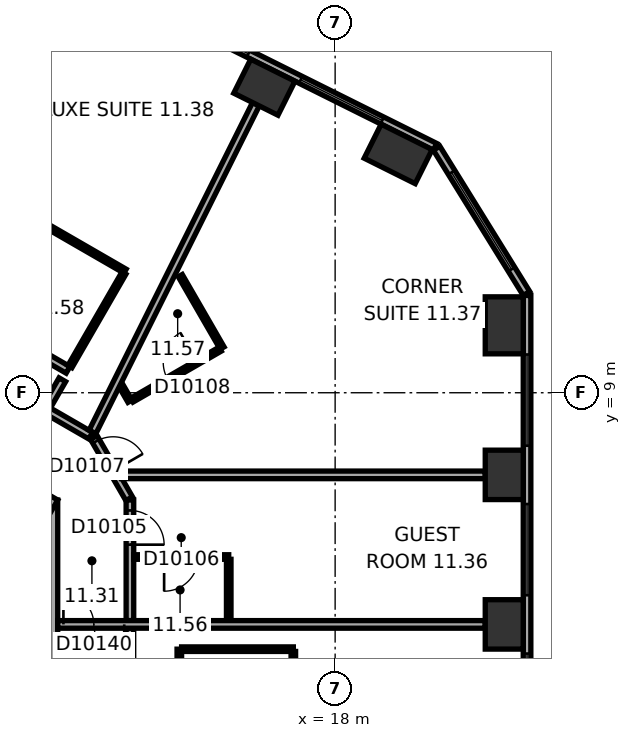
"""IFC4 building model, lengths in metres.
Left out: names, types, materials, properties, quantities, classifications, styles, units other than length and angle.
Written with IfcOpenShell. Run it as: python <this file> out.ifc"""

import sys

from ifc_helpers import new_model, si_unit, direction, frame, frame_2d, origin, origin_2d, place, context, subcontext, project, spatial, rectangle, extrude, element, fill, save


model = new_model("IFC4")
c1 = context("Model", 3, precision=1e-05, world=origin(), true_north=direction((0.0, 1.0)))
c2 = subcontext(c1, "Body", "Model", "MODEL_VIEW")
j1 = project(units=[si_unit("LENGTHUNIT", "METRE"), si_unit("PLANEANGLEUNIT", "RADIAN")], contexts=[c1])
p1 = place(None, origin())
s1 = spatial("IfcSite", under=j1, at=p1, CompositionType="ELEMENT")
p2 = place(p1, origin())
s2 = spatial("IfcBuilding", under=s1, at=p2, CompositionType="ELEMENT")
p3 = place(p2, frame((0.0, 0.0, 57.2)))
s3 = spatial("IfcBuildingStorey", under=s2, at=p3, CompositionType="ELEMENT", Elevation=57.2)
for number, where, z_axis, x_axis in (
    (1, (22.45, 2.905, 0.0), (0.0, 0.0, 1.0), (0.0, 1.0, 0.0)),
    (2, (22.45, 6.839, 0.0), (0.0, 0.0, 1.0), (0.0, 1.0, 0.0)),
):
    element("IfcColumn", number, at=place(p3, frame(where, z_axis=z_axis, x_axis=x_axis)), inside=s3, PredefinedType="COLUMN", context=c2, shape_type="SweptSolid", body=[
        extrude(rectangle(XDim=1.3, YDim=1.0, at=origin_2d()), origin(), (0.0, 0.0, 1.0), 3.3),
    ])
for number, where, z_axis, x_axis in (
    (3, (22.45, 10.774, 0.0), (0.0, 0.0, 1.0), (0.0, 1.0, 0.0)),
    (4, (19.659, 15.284, 0.0), (0.0, 0.0, 1.0), (-0.895, 0.446, 0.0)),
):
    element("IfcColumn", number, at=place(p3, frame(where, z_axis=z_axis, x_axis=x_axis)), inside=s3, PredefinedType="COLUMN", context=c2, shape_type="SweptSolid", body=[
        extrude(rectangle(XDim=1.5, YDim=1.0, at=origin_2d()), origin(), (0.0, 0.0, 1.0), 3.3),
    ])
p4 = place(p3, frame((16.138, 17.04, 0.0), z_axis=(0.0, 0.0, 1.0), x_axis=(-0.894934361602, 0.44619781311, 0.0)))
e5 = element("IfcColumn", 5, at=p4, inside=s3, PredefinedType="COLUMN", context=c2, shape_type="SweptSolid", body=[
    extrude(rectangle(XDim=1.3, YDim=1.0, at=origin_2d()), origin(), (0.0, 0.0, 1.0), 3.3),
])
p5 = place(p3, frame((10.1, -6.177, 0.0), z_axis=(0.0, 0.0, 1.0), x_axis=(0.0, 1.0, 0.0)))
e6 = element("IfcWall", 6, at=p5, inside=s3, PredefinedType="SHEAR", context=c2, shape_type="SweptSolid", body=[
    extrude(rectangle(XDim=12.355, YDim=1.2, at=frame_2d((6.177, 0.0))), origin(), (0.0, 0.0, 1.0), 3.3),
])
p6 = place(p5, frame((6.378, 0.0, 0.0)))
e7 = element("IfcOpeningElement", 7, at=p6, cuts=e6, PredefinedType="OPENING", context=c2, shape_type="SweptSolid", body=[
    extrude(rectangle(XDim=1.5, YDim=2.1, at=frame_2d((0.75, 1.05))), frame((0.0, 0.61, 0.0), z_axis=(0.0, -1.0, 0.0), x_axis=(1.0, 0.0, 0.0)), (0.0, 0.0, 1.0), 1.22),
])
p7 = place(p5, frame((1.828, 0.0, 0.0)))
e8 = element("IfcOpeningElement", 8, at=p7, cuts=e6, PredefinedType="OPENING", context=c2, shape_type="SweptSolid", body=[
    extrude(rectangle(XDim=1.1, YDim=2.1, at=frame_2d((0.55, 1.05))), frame((0.0, 0.61, 0.0), z_axis=(0.0, -1.0, 0.0), x_axis=(1.0, 0.0, 0.0)), (0.0, 0.0, 1.0), 1.22),
])
p8 = place(p5, frame((4.427, 0.0, 0.0)))
e9 = element("IfcOpeningElement", 9, at=p8, cuts=e6, PredefinedType="OPENING", context=c2, shape_type="SweptSolid", body=[
    extrude(rectangle(XDim=1.1, YDim=2.1, at=frame_2d((0.55, 1.05))), frame((0.0, 0.61, 0.0), z_axis=(0.0, -1.0, 0.0), x_axis=(1.0, 0.0, 0.0)), (0.0, 0.0, 1.0), 1.22),
])
p9 = place(p3, frame((10.4, 5.658, 0.0), z_axis=(0.0, 0.0, 1.0), x_axis=(-0.866021384402, 0.500006961711, 0.0)))
e10 = element("IfcWall", 10, at=p9, inside=s3, PredefinedType="SHEAR", context=c2, shape_type="SweptSolid", body=[
    extrude(rectangle(XDim=12.355, YDim=1.2, at=frame_2d((6.178, 0.0))), origin(), (0.0, 0.0, 1.0), 3.3),
])
p10 = place(p9, frame((2.728, 0.0, 0.0)))
e11 = element("IfcOpeningElement", 11, at=p10, cuts=e10, PredefinedType="OPENING", context=c2, shape_type="SweptSolid", body=[
    extrude(rectangle(XDim=1.1, YDim=2.1, at=frame_2d((0.55, 1.05))), frame((0.0, 0.61, 0.0), z_axis=(0.0, -1.0, 0.0), x_axis=(1.0, 0.0, 0.0)), (0.0, 0.0, 1.0), 1.22),
])
p11 = place(p9, frame((5.328, 0.0, 0.0)))
e12 = element("IfcOpeningElement", 12, at=p11, cuts=e10, PredefinedType="OPENING", context=c2, shape_type="SweptSolid", body=[
    extrude(rectangle(XDim=1.1, YDim=2.1, at=frame_2d((0.55, 1.05))), frame((0.0, 0.61, 0.0), z_axis=(0.0, -1.0, 0.0), x_axis=(1.0, 0.0, 0.0)), (0.0, 0.0, 1.0), 1.22),
])
p12 = place(p9, frame((7.928, 0.0, 0.0)))
e13 = element("IfcOpeningElement", 13, at=p12, cuts=e10, PredefinedType="OPENING", context=c2, shape_type="SweptSolid", body=[
    extrude(rectangle(XDim=1.1, YDim=2.1, at=frame_2d((0.55, 1.05))), frame((0.0, 0.61, 0.0), z_axis=(0.0, -1.0, 0.0), x_axis=(1.0, 0.0, 0.0)), (0.0, 0.0, 1.0), 1.22),
])
p13 = place(p3, frame((23.05, -9.687, 0.0), z_axis=(0.0, 0.0, 1.0), x_axis=(0.0, 1.0, 0.0)))
e14 = element("IfcWall", 14, at=p13, inside=s3, PredefinedType="STANDARD", context=c2, shape_type="SweptSolid", body=[
    extrude(rectangle(XDim=21.246, YDim=0.2, at=frame_2d((10.623, 0.0))), origin(), (0.0, 0.0, 1.0), 3.3),
])
p14 = place(p13, frame((1.555, 0.0, 0.8)))
e15 = element("IfcOpeningElement", 15, at=p14, cuts=e14, PredefinedType="OPENING", context=c2, shape_type="SweptSolid", body=[
    extrude(rectangle(XDim=2.4, YDim=1.7, at=frame_2d((1.2, 0.85))), frame((0.0, 0.11, 0.0), z_axis=(0.0, -1.0, 0.0), x_axis=(1.0, 0.0, 0.0)), (0.0, 0.0, 1.0), 0.22),
])
p15 = place(p13, frame((5.489, 0.0, 0.8)))
e16 = element("IfcOpeningElement", 16, at=p15, cuts=e14, PredefinedType="OPENING", context=c2, shape_type="SweptSolid", body=[
    extrude(rectangle(XDim=2.4, YDim=1.7, at=frame_2d((1.2, 0.85))), frame((0.0, 0.11, 0.0), z_axis=(0.0, -1.0, 0.0), x_axis=(1.0, 0.0, 0.0)), (0.0, 0.0, 1.0), 0.22),
])
p16 = place(p13, frame((9.424, 0.0, 0.8)))
e17 = element("IfcOpeningElement", 17, at=p16, cuts=e14, PredefinedType="OPENING", context=c2, shape_type="SweptSolid", body=[
    extrude(rectangle(XDim=2.4, YDim=1.7, at=frame_2d((1.2, 0.85))), frame((0.0, 0.11, 0.0), z_axis=(0.0, -1.0, 0.0), x_axis=(1.0, 0.0, 0.0)), (0.0, 0.0, 1.0), 0.22),
])
p17 = place(p13, frame((13.358, 0.0, 0.8)))
e18 = element("IfcOpeningElement", 18, at=p17, cuts=e14, PredefinedType="OPENING", context=c2, shape_type="SweptSolid", body=[
    extrude(rectangle(XDim=2.4, YDim=1.7, at=frame_2d((1.2, 0.85))), frame((0.0, 0.11, 0.0), z_axis=(0.0, -1.0, 0.0), x_axis=(1.0, 0.0, 0.0)), (0.0, 0.0, 1.0), 0.22),
])
p18 = place(p13, frame((17.293, 0.0, 0.8)))
e19 = element("IfcOpeningElement", 19, at=p18, cuts=e14, PredefinedType="OPENING", context=c2, shape_type="SweptSolid", body=[
    extrude(rectangle(XDim=2.4, YDim=1.7, at=frame_2d((1.2, 0.85))), frame((0.0, 0.11, 0.0), z_axis=(0.0, -1.0, 0.0), x_axis=(1.0, 0.0, 0.0)), (0.0, 0.0, 1.0), 0.22),
])
p19 = place(p3, frame((23.035, 11.612, 0.0), z_axis=(0.0, 0.0, 1.0), x_axis=(-0.526160091227, 0.850385535155, 0.0)))
e20 = element("IfcWall", 20, at=p19, inside=s3, PredefinedType="STANDARD", context=c2, shape_type="SweptSolid", body=[
    extrude(rectangle(XDim=4.494, YDim=0.2, at=frame_2d((2.247, 0.0))), origin(), (0.0, 0.0, 1.0), 3.3),
])
p20 = place(p19, frame((0.747, 0.0, 0.8)))
e21 = element("IfcOpeningElement", 21, at=p20, cuts=e20, PredefinedType="OPENING", context=c2, shape_type="SweptSolid", body=[
    extrude(rectangle(XDim=3.0, YDim=1.7, at=frame_2d((1.5, 0.85))), frame((0.0, 0.11, 0.0), z_axis=(0.0, -1.0, 0.0), x_axis=(1.0, 0.0, 0.0)), (0.0, 0.0, 1.0), 0.22),
])
p21 = place(p3, frame((20.63, 15.47, 0.0), z_axis=(0.0, 0.0, 1.0), x_axis=(-0.894934518609, 0.446197498203, 0.0)))
e22 = element("IfcWall", 22, at=p21, inside=s3, PredefinedType="STANDARD", context=c2, shape_type="SweptSolid", body=[
    extrude(rectangle(XDim=21.246, YDim=0.2, at=frame_2d((10.623, 0.0))), origin(), (0.0, 0.0, 1.0), 3.3),
])
p22 = place(p21, frame((1.553, 0.0, 0.8)))
e23 = element("IfcOpeningElement", 23, at=p22, cuts=e22, PredefinedType="OPENING", context=c2, shape_type="SweptSolid", body=[
    extrude(rectangle(XDim=2.4, YDim=1.7, at=frame_2d((1.2, 0.85))), frame((0.0, 0.11, 0.0), z_axis=(0.0, -1.0, 0.0), x_axis=(1.0, 0.0, 0.0)), (0.0, 0.0, 1.0), 0.22),
])
p23 = place(p21, frame((5.488, 0.0, 0.8)))
e24 = element("IfcOpeningElement", 24, at=p23, cuts=e22, PredefinedType="OPENING", context=c2, shape_type="SweptSolid", body=[
    extrude(rectangle(XDim=2.4, YDim=1.7, at=frame_2d((1.2, 0.85))), frame((0.0, 0.11, 0.0), z_axis=(0.0, -1.0, 0.0), x_axis=(1.0, 0.0, 0.0)), (0.0, 0.0, 1.0), 0.22),
])
p24 = place(p21, frame((9.422, 0.0, 0.8)))
e25 = element("IfcOpeningElement", 25, at=p24, cuts=e22, PredefinedType="OPENING", context=c2, shape_type="SweptSolid", body=[
    extrude(rectangle(XDim=2.4, YDim=1.7, at=frame_2d((1.2, 0.85))), frame((0.0, 0.11, 0.0), z_axis=(0.0, -1.0, 0.0), x_axis=(1.0, 0.0, 0.0)), (0.0, 0.0, 1.0), 0.22),
])
p25 = place(p21, frame((13.357, 0.0, 0.8)))
e26 = element("IfcOpeningElement", 26, at=p25, cuts=e22, PredefinedType="OPENING", context=c2, shape_type="SweptSolid", body=[
    extrude(rectangle(XDim=2.4, YDim=1.7, at=frame_2d((1.2, 0.85))), frame((0.0, 0.11, 0.0), z_axis=(0.0, -1.0, 0.0), x_axis=(1.0, 0.0, 0.0)), (0.0, 0.0, 1.0), 0.22),
])
p26 = place(p21, frame((17.292, 0.0, 0.8)))
e27 = element("IfcOpeningElement", 27, at=p26, cuts=e22, PredefinedType="OPENING", context=c2, shape_type="SweptSolid", body=[
    extrude(rectangle(XDim=2.4, YDim=1.7, at=frame_2d((1.2, 0.85))), frame((0.0, 0.11, 0.0), z_axis=(0.0, -1.0, 0.0), x_axis=(1.0, 0.0, 0.0)), (0.0, 0.0, 1.0), 0.22),
])
p27 = place(p3, frame((9.926, 13.67, 0.0), z_axis=(0.0, 0.0, 1.0), x_axis=(0.866032090307, -0.499988418424, 0.0)))
e28 = element("IfcWall", 28, at=p27, inside=s3, PredefinedType="PARTITIONING", context=c2, shape_type="SweptSolid", body=[
    extrude(rectangle(XDim=2.94, YDim=0.12, at=frame_2d((1.47, 0.0))), origin(), (0.0, 0.0, 1.0), 3.05),
])
p28 = place(p3, frame((10.371, 8.561, 0.0), z_axis=(0.0, 0.0, 1.0), x_axis=(0.50004290449, 0.866000631449, 0.0)))
e29 = element("IfcWall", 29, at=p28, inside=s3, PredefinedType="PARTITIONING", context=c2, shape_type="SweptSolid", body=[
    extrude(rectangle(XDim=0.901, YDim=0.2, at=frame_2d((0.451, 0.0))), origin(), (0.0, 0.0, 1.0), 3.05),
])
p29 = place(p3, frame((10.972, 9.602, 0.0), z_axis=(0.0, 0.0, 1.0), x_axis=(-0.866033277307, 0.499986362411, 0.0)))
e30 = element("IfcWall", 30, at=p29, inside=s3, PredefinedType="PARTITIONING", context=c2, shape_type="SweptSolid", body=[
    extrude(rectangle(XDim=8.702, YDim=0.2, at=frame_2d((4.351, 0.0))), origin(), (0.0, 0.0, 1.0), 3.05),
])
p30 = place(p29, frame((4.364, 0.0, 0.0)))
e31 = element("IfcOpeningElement", 31, at=p30, cuts=e30, PredefinedType="OPENING", context=c2, shape_type="SweptSolid", body=[
    extrude(rectangle(XDim=0.9, YDim=2.1, at=frame_2d((0.45, 1.05))), frame((0.0, 0.11, 0.0), z_axis=(0.0, -1.0, 0.0), x_axis=(1.0, 0.0, 0.0)), (0.0, 0.0, 1.0), 0.22),
])
p31 = place(p3, frame((11.566, 7.871, 0.0), z_axis=(0.0, 0.0, 1.0), x_axis=(-0.866004557827, 0.500036104519, 0.0)))
e32 = element("IfcWall", 32, at=p31, inside=s3, PredefinedType="PARTITIONING", context=c2, shape_type="SweptSolid", body=[
    extrude(rectangle(XDim=1.28, YDim=0.2, at=frame_2d((0.64, 0.0))), origin(), (0.0, 0.0, 1.0), 3.05),
])
p32 = place(p3, frame((12.442, 12.148, 0.0), z_axis=(0.0, 0.0, 1.0), x_axis=(-0.49994816717, -0.866055327414, 0.0)))
e33 = element("IfcWall", 33, at=p32, inside=s3, PredefinedType="PARTITIONING", context=c2, shape_type="SweptSolid", body=[
    extrude(rectangle(XDim=2.84, YDim=0.12, at=frame_2d((1.42, 0.0))), origin(), (0.0, 0.0, 1.0), 3.05),
])
p33 = place(p3, frame((12.58, 6.212, 0.0), z_axis=(0.0, 0.0, 1.0), x_axis=(-0.500063286585, 0.865988862174, 0.0)))
e34 = element("IfcWall", 34, at=p33, inside=s3, PredefinedType="PARTITIONING", context=c2, shape_type="SweptSolid", body=[
    extrude(rectangle(XDim=1.86, YDim=0.2, at=frame_2d((0.93, 0.0))), origin(), (0.0, 0.0, 1.0), 3.05),
])
p34 = place(p33, frame((0.842, 0.0, 0.0)))
e35 = element("IfcOpeningElement", 35, at=p34, cuts=e34, PredefinedType="OPENING", context=c2, shape_type="SweptSolid", body=[
    extrude(rectangle(XDim=0.9, YDim=2.1, at=frame_2d((0.45, 1.05))), frame((0.0, 0.11, 0.0), z_axis=(0.0, -1.0, 0.0), x_axis=(1.0, 0.0, 0.0)), (0.0, 0.0, 1.0), 0.22),
])
p35 = place(p3, frame((12.6, 0.201, 0.0), z_axis=(0.0, 0.0, 1.0), x_axis=(0.0, 1.0, 0.0)))
e36 = element("IfcWall", 36, at=p35, inside=s3, PredefinedType="PARTITIONING", context=c2, shape_type="SweptSolid", body=[
    extrude(rectangle(XDim=2.604, YDim=0.2, at=frame_2d((1.302, 0.0))), origin(), (0.0, 0.0, 1.0), 3.05),
])
p36 = place(p3, frame((12.6, 3.004, 0.0), z_axis=(0.0, 0.0, 1.0), x_axis=(0.0, 1.0, 0.0)))
e37 = element("IfcWall", 37, at=p36, inside=s3, PredefinedType="PARTITIONING", context=c2, shape_type="SweptSolid", body=[
    extrude(rectangle(XDim=3.173, YDim=0.2, at=frame_2d((1.586, 0.0))), origin(), (0.0, 0.0, 1.0), 3.05),
])
p37 = place(p36, frame((1.998, 0.0, 0.0)))
e38 = element("IfcOpeningElement", 38, at=p37, cuts=e37, PredefinedType="OPENING", context=c2, shape_type="SweptSolid", body=[
    extrude(rectangle(XDim=0.9, YDim=2.1, at=frame_2d((0.45, 1.05))), frame((0.0, 0.11, 0.0), z_axis=(0.0, -1.0, 0.0), x_axis=(1.0, 0.0, 0.0)), (0.0, 0.0, 1.0), 0.22),
])
p38 = place(p3, frame((12.601, 8.776, 0.0), z_axis=(0.0, 0.0, 1.0), x_axis=(-0.500166486798, 0.865929261247, 0.0)))
e39 = element("IfcWall", 39, at=p38, inside=s3, PredefinedType="PARTITIONING", context=c2, shape_type="SweptSolid", body=[
    extrude(rectangle(XDim=0.476, YDim=0.12, at=frame_2d((0.238, 0.0))), origin(), (0.0, 0.0, 1.0), 3.05),
])
p39 = place(p3, frame((12.7, 4.677, 0.0), z_axis=(0.0, 0.0, 1.0), x_axis=(1.0, 0.0, 0.0)))
e40 = element("IfcWall", 40, at=p39, inside=s3, PredefinedType="PARTITIONING", context=c2, shape_type="SweptSolid", body=[
    extrude(rectangle(XDim=2.5, YDim=0.12, at=frame_2d((1.25, 0.0))), origin(), (0.0, 0.0, 1.0), 3.05),
])
p40 = place(p39, frame((0.8, 0.0, 0.0)))
e41 = element("IfcOpeningElement", 41, at=p40, cuts=e40, PredefinedType="OPENING", context=c2, shape_type="SweptSolid", body=[
    extrude(rectangle(XDim=0.9, YDim=2.1, at=frame_2d((0.45, 1.05))), frame((0.0, 0.07, 0.0), z_axis=(0.0, -1.0, 0.0), x_axis=(1.0, 0.0, 0.0)), (0.0, 0.0, 1.0), 0.14),
])
p41 = place(p3, frame((13.9, 0.853, 0.0), z_axis=(0.0, 0.0, 1.0), x_axis=(0.0, 1.0, 0.0)))
e42 = element("IfcWall", 42, at=p41, inside=s3, PredefinedType="PARTITIONING", context=c2, shape_type="SweptSolid", body=[
    extrude(rectangle(XDim=1.4, YDim=0.12, at=frame_2d((0.7, 0.0))), origin(), (0.0, 0.0, 1.0), 3.05),
])
p42 = place(p3, frame((13.926, 12.081, 0.0), z_axis=(0.0, 0.0, 1.0), x_axis=(0.499994660107, -0.866028486751, 0.0)))
e43 = element("IfcWall", 43, at=p42, inside=s3, PredefinedType="PARTITIONING", context=c2, shape_type="SweptSolid", body=[
    extrude(rectangle(XDim=2.2, YDim=0.12, at=frame_2d((1.1, 0.0))), origin(), (0.0, 0.0, 1.0), 3.05),
])
p43 = place(p3, frame((13.96, 2.253, 0.0), z_axis=(0.0, 0.0, 1.0), x_axis=(1.0, 0.0, 0.0)))
e44 = element("IfcWall", 44, at=p43, inside=s3, PredefinedType="PARTITIONING", context=c2, shape_type="SweptSolid", body=[
    extrude(rectangle(XDim=2.94, YDim=0.12, at=frame_2d((1.47, 0.0))), origin(), (0.0, 0.0, 1.0), 3.05),
])
p44 = place(p3, frame((14.974, 10.146, 0.0), z_axis=(0.0, 0.0, 1.0), x_axis=(-0.86599746015, -0.500048396672, 0.0)))
e45 = element("IfcWall", 45, at=p44, inside=s3, PredefinedType="PARTITIONING", context=c2, shape_type="SweptSolid", body=[
    extrude(rectangle(XDim=2.68, YDim=0.12, at=frame_2d((1.34, 0.0))), origin(), (0.0, 0.0, 1.0), 3.05),
])
p45 = place(p44, frame((0.69, 0.0, 0.0)))
e46 = element("IfcOpeningElement", 46, at=p45, cuts=e45, PredefinedType="OPENING", context=c2, shape_type="SweptSolid", body=[
    extrude(rectangle(XDim=0.9, YDim=2.1, at=frame_2d((0.45, 1.05))), frame((0.0, 0.07, 0.0), z_axis=(0.0, -1.0, 0.0), x_axis=(1.0, 0.0, 0.0)), (0.0, 0.0, 1.0), 0.14),
])
p46 = place(p3, frame((15.2, 4.618, 0.0), z_axis=(0.0, 0.0, 1.0), x_axis=(0.0, -1.0, 0.0)))
e47 = element("IfcWall", 47, at=p46, inside=s3, PredefinedType="PARTITIONING", context=c2, shape_type="SweptSolid", body=[
    extrude(rectangle(XDim=1.613, YDim=0.12, at=frame_2d((0.807, 0.0))), origin(), (0.0, 0.0, 1.0), 3.05),
])
p47 = place(p3, frame((15.915, 16.592, 0.0), z_axis=(0.0, 0.0, 1.0), x_axis=(-0.446199736347, -0.894933402709, 0.0)))
e48 = element("IfcWall", 48, at=p47, inside=s3, PredefinedType="PARTITIONING", context=c2, shape_type="SweptSolid", body=[
    extrude(rectangle(XDim=9.635, YDim=0.2, at=frame_2d((4.817, 0.0))), origin(), (0.0, 0.0, 1.0), 3.05),
])
p48 = place(p3, frame((16.9, 2.193, 0.0), z_axis=(0.0, 0.0, 1.0), x_axis=(0.0, -1.0, 0.0)))
e49 = element("IfcWall", 49, at=p48, inside=s3, PredefinedType="PARTITIONING", context=c2, shape_type="SweptSolid", body=[
    extrude(rectangle(XDim=1.28, YDim=0.12, at=frame_2d((0.64, 0.0))), origin(), (0.0, 0.0, 1.0), 3.05),
])
p49 = place(p3, frame((21.95, 2.905, 0.0), z_axis=(0.0, 0.0, 1.0), x_axis=(-1.0, 0.0, 0.0)))
e50 = element("IfcWall", 50, at=p49, inside=s3, PredefinedType="PARTITIONING", context=c2, shape_type="SweptSolid", body=[
    extrude(rectangle(XDim=11.25, YDim=0.2, at=frame_2d((5.625, 0.0))), origin(), (0.0, 0.0, 1.0), 3.05),
])
p50 = place(p49, frame((9.5, 0.0, 0.0)))
e51 = element("IfcOpeningElement", 51, at=p50, cuts=e50, PredefinedType="OPENING", context=c2, shape_type="SweptSolid", body=[
    extrude(rectangle(XDim=1.6, YDim=2.1, at=frame_2d((0.8, 1.05))), frame((0.0, 0.11, 0.0), z_axis=(0.0, -1.0, 0.0), x_axis=(1.0, 0.0, 0.0)), (0.0, 0.0, 1.0), 0.22),
])
p51 = place(p3, frame((21.95, 6.839, 0.0), z_axis=(0.0, 0.0, 1.0), x_axis=(-1.0, 0.0, 0.0)))
e52 = element("IfcWall", 52, at=p51, inside=s3, PredefinedType="PARTITIONING", context=c2, shape_type="SweptSolid", body=[
    extrude(rectangle(XDim=9.572, YDim=0.2, at=frame_2d((4.786, 0.0))), origin(), (0.0, 0.0, 1.0), 3.05),
])
p52 = place(p16, origin())
e53 = element("IfcWindow", 53, at=p52, inside=s3, PartitioningType="SINGLE_PANEL", PredefinedType="WINDOW", context=c2, shape_type="SweptSolid", body=[
    extrude(rectangle(XDim=2.4, YDim=1.7, at=frame_2d((1.2, 0.85))), frame((0.0, 0.03, 0.0), z_axis=(0.0, -1.0, 0.0), x_axis=(1.0, 0.0, 0.0)), (0.0, 0.0, 1.0), 0.06),
])
fill(e17, e53)
p53 = place(p17, origin())
e54 = element("IfcWindow", 54, at=p53, inside=s3, PartitioningType="SINGLE_PANEL", PredefinedType="WINDOW", context=c2, shape_type="SweptSolid", body=[
    extrude(rectangle(XDim=2.4, YDim=1.7, at=frame_2d((1.2, 0.85))), frame((0.0, 0.03, 0.0), z_axis=(0.0, -1.0, 0.0), x_axis=(1.0, 0.0, 0.0)), (0.0, 0.0, 1.0), 0.06),
])
fill(e18, e54)
p54 = place(p18, origin())
e55 = element("IfcWindow", 55, at=p54, inside=s3, PartitioningType="SINGLE_PANEL", PredefinedType="WINDOW", context=c2, shape_type="SweptSolid", body=[
    extrude(rectangle(XDim=2.4, YDim=1.7, at=frame_2d((1.2, 0.85))), frame((0.0, 0.03, 0.0), z_axis=(0.0, -1.0, 0.0), x_axis=(1.0, 0.0, 0.0)), (0.0, 0.0, 1.0), 0.06),
])
fill(e19, e55)
p55 = place(p20, origin())
e56 = element("IfcWindow", 56, at=p55, inside=s3, PartitioningType="SINGLE_PANEL", PredefinedType="WINDOW", context=c2, shape_type="SweptSolid", body=[
    extrude(rectangle(XDim=3.0, YDim=1.7, at=frame_2d((1.5, 0.85))), frame((0.0, 0.03, 0.0), z_axis=(0.0, -1.0, 0.0), x_axis=(1.0, 0.0, 0.0)), (0.0, 0.0, 1.0), 0.06),
])
fill(e21, e56)
p56 = place(p22, origin())
e57 = element("IfcWindow", 57, at=p56, inside=s3, PartitioningType="SINGLE_PANEL", PredefinedType="WINDOW", context=c2, shape_type="SweptSolid", body=[
    extrude(rectangle(XDim=2.4, YDim=1.7, at=frame_2d((1.2, 0.85))), frame((0.0, 0.03, 0.0), z_axis=(0.0, -1.0, 0.0), x_axis=(1.0, 0.0, 0.0)), (0.0, 0.0, 1.0), 0.06),
])
fill(e23, e57)
p57 = place(p23, origin())
e58 = element("IfcWindow", 58, at=p57, inside=s3, PartitioningType="SINGLE_PANEL", PredefinedType="WINDOW", context=c2, shape_type="SweptSolid", body=[
    extrude(rectangle(XDim=2.4, YDim=1.7, at=frame_2d((1.2, 0.85))), frame((0.0, 0.03, 0.0), z_axis=(0.0, -1.0, 0.0), x_axis=(1.0, 0.0, 0.0)), (0.0, 0.0, 1.0), 0.06),
])
fill(e24, e58)
p58 = place(p37, origin())
e59 = element("IfcDoor", 59, at=p58, inside=s3, OperationType="SINGLE_SWING_LEFT", PredefinedType="DOOR", context=c2, shape_type="SweptSolid", body=[
    extrude(rectangle(XDim=0.9, YDim=2.1, at=frame_2d((0.45, 1.05))), frame((0.0, 0.025, 0.0), z_axis=(0.0, -1.0, 0.0), x_axis=(1.0, 0.0, 0.0)), (0.0, 0.0, 1.0), 0.05),
])
fill(e38, e59)
p59 = place(p40, origin())
e60 = element("IfcDoor", 60, at=p59, inside=s3, OperationType="SINGLE_SWING_LEFT", PredefinedType="DOOR", context=c2, shape_type="SweptSolid", body=[
    extrude(rectangle(XDim=0.9, YDim=2.1, at=frame_2d((0.45, 1.05))), frame((0.0, 0.025, 0.0), z_axis=(0.0, -1.0, 0.0), x_axis=(1.0, 0.0, 0.0)), (0.0, 0.0, 1.0), 0.05),
])
fill(e41, e60)
p60 = place(p34, origin())
e61 = element("IfcDoor", 61, at=p60, inside=s3, OperationType="SINGLE_SWING_LEFT", PredefinedType="DOOR", context=c2, shape_type="SweptSolid", body=[
    extrude(rectangle(XDim=0.9, YDim=2.1, at=frame_2d((0.45, 1.05))), frame((0.0, 0.025, 0.0), z_axis=(0.0, -1.0, 0.0), x_axis=(1.0, 0.0, 0.0)), (0.0, 0.0, 1.0), 0.05),
])
fill(e35, e61)
p61 = place(p45, origin())
e62 = element("IfcDoor", 62, at=p61, inside=s3, OperationType="SINGLE_SWING_LEFT", PredefinedType="DOOR", context=c2, shape_type="SweptSolid", body=[
    extrude(rectangle(XDim=0.9, YDim=2.1, at=frame_2d((0.45, 1.05))), frame((0.0, 0.025, 0.0), z_axis=(0.0, -1.0, 0.0), x_axis=(1.0, 0.0, 0.0)), (0.0, 0.0, 1.0), 0.05),
])
fill(e46, e62)
p62 = place(p50, origin())
e63 = element("IfcDoor", 63, at=p62, inside=s3, OperationType="DOUBLE_DOOR_SINGLE_SWING", PredefinedType="DOOR", context=c2, shape_type="SweptSolid", body=[
    extrude(rectangle(XDim=1.6, YDim=2.1, at=frame_2d((0.8, 1.05))), frame((0.0, 0.025, 0.0), z_axis=(0.0, -1.0, 0.0), x_axis=(1.0, 0.0, 0.0)), (0.0, 0.0, 1.0), 0.05),
])
fill(e51, e63)
save(model, sys.argv[1])
